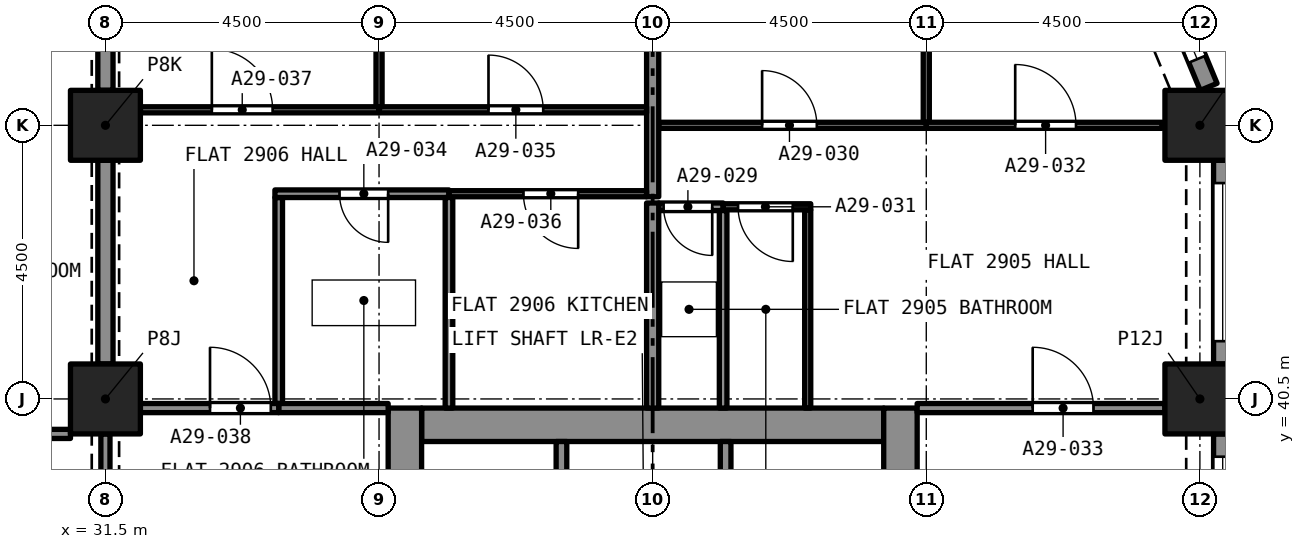
"""IFC4 building model, lengths in metres.
Left out: names, types, materials, properties, quantities, classifications, styles, units other than length and angle.
Written with IfcOpenShell. Run it as: python <this file> out.ifc"""

import sys

from ifc_helpers import new_model, si_unit, direction, frame, frame_2d, origin, origin_2d, place, context, subcontext, project, spatial, rectangle, extrude, element, fill, save


model = new_model("IFC4")
c1 = context("Model", 3, precision=1e-05, world=origin(), true_north=direction((0.0, 1.0)))
c2 = subcontext(c1, "Body", "Model", "MODEL_VIEW")
j1 = project(units=[si_unit("LENGTHUNIT", "METRE"), si_unit("PLANEANGLEUNIT", "RADIAN")], contexts=[c1])
p1 = place(None, origin())
s1 = spatial("IfcSite", under=j1, at=p1, CompositionType="ELEMENT")
p2 = place(p1, origin())
s2 = spatial("IfcBuilding", under=s1, at=p2, CompositionType="ELEMENT")
p3 = place(p2, frame((0.0, 0.0, 105.6)))
s3 = spatial("IfcBuildingStorey", under=s2, at=p3, CompositionType="ELEMENT", Elevation=105.6)
for number, where, z_axis, x_axis in (
    (1, (31.5, 40.5, 0.0), (0.0, 0.0, 1.0), (1.0, 0.0, 0.0)),
    (2, (49.5, 40.5, 0.0), (0.0, 0.0, 1.0), (1.0, 0.0, 0.0)),
    (3, (31.5, 45.0, 0.0), (0.0, 0.0, 1.0), (1.0, 0.0, 0.0)),
    (4, (49.5, 45.0, 0.0), (0.0, 0.0, 1.0), (1.0, 0.0, 0.0)),
):
    element("IfcColumn", number, at=place(p3, frame(where, z_axis=z_axis, x_axis=x_axis)), inside=s3, PredefinedType="COLUMN", context=c2, shape_type="SweptSolid", body=[
        extrude(rectangle(XDim=1.15, YDim=1.15, at=origin_2d()), origin(), (0.0, 0.0, 1.0), 3.2),
    ])
p4 = place(p3, frame((36.7, 40.075, 0.0), z_axis=(0.0, 0.0, 1.0), x_axis=(1.0, 0.0, 0.0)))
e5 = element("IfcWall", 5, at=p4, inside=s3, PredefinedType="SOLIDWALL", context=c2, shape_type="SweptSolid", body=[
    extrude(rectangle(XDim=7.6, YDim=0.55, at=frame_2d((3.8, 0.0))), origin(), (0.0, 0.0, 1.0), 3.2),
])
p5 = place(p3, frame((36.425, 27.15, 0.0), z_axis=(0.0, 0.0, 1.0), x_axis=(0.0, 1.0, 0.0)))
e6 = element("IfcWall", 6, at=p5, inside=s3, PredefinedType="SOLIDWALL", context=c2, shape_type="SweptSolid", body=[
    extrude(rectangle(XDim=13.2, YDim=0.55, at=frame_2d((6.6, 0.0))), origin(), (0.0, 0.0, 1.0), 3.2),
])
p6 = place(p5, frame((8.8, 0.0, 0.0)))
e7 = element("IfcOpeningElement", 7, at=p6, cuts=e6, PredefinedType="OPENING", context=c2, shape_type="SweptSolid", body=[
    extrude(rectangle(XDim=1.2, YDim=2.1, at=frame_2d((0.6, 1.05))), frame((0.0, 0.285, 0.0), z_axis=(0.0, -1.0, 0.0), x_axis=(1.0, 0.0, 0.0)), (0.0, 0.0, 1.0), 0.57),
])
p7 = place(p3, frame((44.575, 27.15, 0.0), z_axis=(0.0, 0.0, 1.0), x_axis=(0.0, 1.0, 0.0)))
e8 = element("IfcWall", 8, at=p7, inside=s3, PredefinedType="SOLIDWALL", context=c2, shape_type="SweptSolid", body=[
    extrude(rectangle(XDim=13.2, YDim=0.55, at=frame_2d((6.6, 0.0))), origin(), (0.0, 0.0, 1.0), 3.2),
])
p8 = place(p7, frame((8.8, 0.0, 0.0)))
e9 = element("IfcOpeningElement", 9, at=p8, cuts=e8, PredefinedType="OPENING", context=c2, shape_type="SweptSolid", body=[
    extrude(rectangle(XDim=1.2, YDim=2.1, at=frame_2d((0.6, 1.05))), frame((0.0, 0.285, 0.0), z_axis=(0.0, -1.0, 0.0), x_axis=(1.0, 0.0, 0.0)), (0.0, 0.0, 1.0), 0.57),
])
p9 = place(p3, frame((49.875, 39.925, 0.0), z_axis=(0.0, 0.0, 1.0), x_axis=(0.0, -1.0, 0.0)))
e10 = element("IfcWall", 10, at=p9, inside=s3, PredefinedType="SOLIDWALL", context=c2, shape_type="SweptSolid", body=[
    extrude(rectangle(XDim=3.35, YDim=0.3, at=frame_2d((1.675, 0.0))), origin(), (0.0, 0.0, 1.0), 3.2),
])
p10 = place(p9, frame((0.375, 0.0, 0.45)))
e11 = element("IfcOpeningElement", 11, at=p10, cuts=e10, PredefinedType="OPENING", context=c2, shape_type="SweptSolid", body=[
    extrude(rectangle(XDim=2.6, YDim=1.95, at=frame_2d((1.3, 0.975))), frame((0.0, 0.16, 0.0), z_axis=(0.0, -1.0, 0.0), x_axis=(1.0, 0.0, 0.0)), (0.0, 0.0, 1.0), 0.32),
])
p11 = place(p3, frame((49.875, 44.425, 0.0), z_axis=(0.0, 0.0, 1.0), x_axis=(0.0, -1.0, 0.0)))
e12 = element("IfcWall", 12, at=p11, inside=s3, PredefinedType="SOLIDWALL", context=c2, shape_type="SweptSolid", body=[
    extrude(rectangle(XDim=3.35, YDim=0.3, at=frame_2d((1.675, 0.0))), origin(), (0.0, 0.0, 1.0), 3.2),
])
p12 = place(p11, frame((0.375, 0.0, 0.45)))
e13 = element("IfcOpeningElement", 13, at=p12, cuts=e12, PredefinedType="OPENING", context=c2, shape_type="SweptSolid", body=[
    extrude(rectangle(XDim=2.6, YDim=1.95, at=frame_2d((1.3, 0.975))), frame((0.0, 0.16, 0.0), z_axis=(0.0, -1.0, 0.0), x_axis=(1.0, 0.0, 0.0)), (0.0, 0.0, 1.0), 0.32),
])
p13 = place(p3, frame((48.816, 47.631, 0.0), z_axis=(0.0, 0.0, 1.0), x_axis=(0.382723818695, -0.923862802911, 0.0)))
e14 = element("IfcWall", 14, at=p13, inside=s3, PredefinedType="SOLIDWALL", context=c2, shape_type="SweptSolid", body=[
    extrude(rectangle(XDim=2.164, YDim=0.3, at=frame_2d((1.082, 0.0))), origin(), (0.0, 0.0, 1.0), 3.2),
])
p14 = place(p13, frame((0.271, 0.0, 0.45)))
e15 = element("IfcOpeningElement", 15, at=p14, cuts=e14, PredefinedType="OPENING", context=c2, shape_type="SweptSolid", body=[
    extrude(rectangle(XDim=1.4, YDim=1.95, at=frame_2d((0.7, 0.975))), frame((0.0, 0.16, 0.0), z_axis=(0.0, -1.0, 0.0), x_axis=(1.0, 0.0, 0.0)), (0.0, 0.0, 1.0), 0.32),
])
p15 = place(p3, frame((41.659, 43.66, 0.0), z_axis=(0.0, 0.0, 1.0), x_axis=(-1.0, 0.0, 0.0)))
e16 = element("IfcWall", 16, at=p15, inside=s3, PredefinedType="PARTITIONING", context=c2, shape_type="SweptSolid", body=[
    extrude(rectangle(XDim=1.059, YDim=0.125, at=frame_2d((0.53, 0.0))), origin(), (0.0, 0.0, 1.0), 2.9),
])
p16 = place(p15, frame((0.179, 0.0, 0.0)))
e17 = element("IfcOpeningElement", 17, at=p16, cuts=e16, PredefinedType="OPENING", context=c2, shape_type="SweptSolid", body=[
    extrude(rectangle(XDim=0.8, YDim=2.1, at=frame_2d((0.4, 1.05))), frame((0.0, 0.073, 0.0), z_axis=(0.0, -1.0, 0.0), x_axis=(1.0, 0.0, 0.0)), (0.0, 0.0, 1.0), 0.145),
])
p17 = place(p3, frame((41.659, 40.35, 0.0), z_axis=(0.0, 0.0, 1.0), x_axis=(0.0, 1.0, 0.0)))
e18 = element("IfcWall", 18, at=p17, inside=s3, PredefinedType="PARTITIONING", context=c2, shape_type="SweptSolid", body=[
    extrude(rectangle(XDim=3.247, YDim=0.125, at=frame_2d((1.624, 0.0))), origin(), (0.0, 0.0, 1.0), 2.9),
])
p18 = place(p3, frame((40.5, 40.35, 0.0), z_axis=(0.0, 0.0, 1.0), x_axis=(0.0, 1.0, 0.0)))
e19 = element("IfcWall", 19, at=p18, inside=s3, PredefinedType="PARTITIONING", context=c2, shape_type="SweptSolid", body=[
    extrude(rectangle(XDim=3.372, YDim=0.2, at=frame_2d((1.686, 0.0))), origin(), (0.0, 0.0, 1.0), 2.9),
])
p19 = place(p3, frame((40.6, 45.0, 0.0), z_axis=(0.0, 0.0, 1.0), x_axis=(1.0, 0.0, 0.0)))
e20 = element("IfcWall", 20, at=p19, inside=s3, PredefinedType="PARTITIONING", context=c2, shape_type="SweptSolid", body=[
    extrude(rectangle(XDim=4.4, YDim=0.1, at=frame_2d((2.2, 0.0))), origin(), (0.0, 0.0, 1.0), 2.9),
])
p20 = place(p19, frame((1.7, 0.0, 0.0)))
e21 = element("IfcOpeningElement", 21, at=p20, cuts=e20, PredefinedType="OPENING", context=c2, shape_type="SweptSolid", body=[
    extrude(rectangle(XDim=0.9, YDim=2.1, at=frame_2d((0.45, 1.05))), frame((0.0, 0.06, 0.0), z_axis=(0.0, -1.0, 0.0), x_axis=(1.0, 0.0, 0.0)), (0.0, 0.0, 1.0), 0.12),
])
p21 = place(p3, frame((45.0, 45.05, 0.0), z_axis=(0.0, 0.0, 1.0), x_axis=(0.0, 1.0, 0.0)))
e22 = element("IfcWall", 22, at=p21, inside=s3, PredefinedType="PARTITIONING", context=c2, shape_type="SweptSolid", body=[
    extrude(rectangle(XDim=3.828, YDim=0.1, at=frame_2d((1.914, 0.0))), origin(), (0.0, 0.0, 1.0), 2.9),
])
p22 = place(p3, frame((43.05, 40.35, 0.0), z_axis=(0.0, 0.0, 1.0), x_axis=(0.0, 1.0, 0.0)))
e23 = element("IfcWall", 23, at=p22, inside=s3, PredefinedType="PARTITIONING", context=c2, shape_type="SweptSolid", body=[
    extrude(rectangle(XDim=3.26, YDim=0.1, at=frame_2d((1.63, 0.0))), origin(), (0.0, 0.0, 1.0), 2.9),
])
p23 = place(p3, frame((43.1, 43.66, 0.0), z_axis=(0.0, 0.0, 1.0), x_axis=(-1.0, 0.0, 0.0)))
e24 = element("IfcWall", 24, at=p23, inside=s3, PredefinedType="PARTITIONING", context=c2, shape_type="SweptSolid", body=[
    extrude(rectangle(XDim=1.441, YDim=0.1, at=frame_2d((0.72, 0.0))), origin(), (0.0, 0.0, 1.0), 2.9),
])
p24 = place(p23, frame((0.295, 0.0, 0.0)))
e25 = element("IfcOpeningElement", 25, at=p24, cuts=e24, PredefinedType="OPENING", context=c2, shape_type="SweptSolid", body=[
    extrude(rectangle(XDim=0.9, YDim=2.1, at=frame_2d((0.45, 1.05))), frame((0.0, 0.06, 0.0), z_axis=(0.0, -1.0, 0.0), x_axis=(1.0, 0.0, 0.0)), (0.0, 0.0, 1.0), 0.12),
])
p25 = place(p3, frame((45.0, 45.0, 0.0), z_axis=(0.0, 0.0, 1.0), x_axis=(1.0, 0.0, 0.0)))
e26 = element("IfcWall", 26, at=p25, inside=s3, PredefinedType="PARTITIONING", context=c2, shape_type="SweptSolid", body=[
    extrude(rectangle(XDim=3.878, YDim=0.1, at=frame_2d((1.939, 0.0))), origin(), (0.0, 0.0, 1.0), 2.9),
])
p26 = place(p25, frame((1.462, 0.0, 0.0)))
e27 = element("IfcOpeningElement", 27, at=p26, cuts=e26, PredefinedType="OPENING", context=c2, shape_type="SweptSolid", body=[
    extrude(rectangle(XDim=1.0, YDim=2.1, at=frame_2d((0.5, 1.05))), frame((0.0, 0.06, 0.0), z_axis=(0.0, -1.0, 0.0), x_axis=(1.0, 0.0, 0.0)), (0.0, 0.0, 1.0), 0.12),
])
p27 = place(p3, frame((40.5, 43.825, 0.0), z_axis=(0.0, 0.0, 1.0), x_axis=(0.0, 1.0, 0.0)))
e28 = element("IfcWall", 28, at=p27, inside=s3, PredefinedType="PARTITIONING", context=c2, shape_type="SweptSolid", body=[
    extrude(rectangle(XDim=5.1, YDim=0.2, at=frame_2d((2.55, 0.0))), origin(), (0.0, 0.0, 1.0), 2.9),
])
p28 = place(p3, frame((44.85, 40.35, 0.0), z_axis=(0.0, 0.0, 1.0), x_axis=(1.0, 0.0, 0.0)))
e29 = element("IfcWall", 29, at=p28, inside=s3, PredefinedType="PARTITIONING", context=c2, shape_type="SweptSolid", body=[
    extrude(rectangle(XDim=4.075, YDim=0.15, at=frame_2d((2.038, 0.0))), origin(), (0.0, 0.0, 1.0), 2.9),
])
p29 = place(p28, frame((1.9, 0.0, 0.0)))
e30 = element("IfcOpeningElement", 30, at=p29, cuts=e29, PredefinedType="OPENING", context=c2, shape_type="SweptSolid", body=[
    extrude(rectangle(XDim=1.0, YDim=2.1, at=frame_2d((0.5, 1.05))), frame((0.0, 0.085, 0.0), z_axis=(0.0, -1.0, 0.0), x_axis=(1.0, 0.0, 0.0)), (0.0, 0.0, 1.0), 0.17),
])
p30 = place(p3, frame((34.35, 40.425, 0.0), z_axis=(0.0, 0.0, 1.0), x_axis=(0.0, 1.0, 0.0)))
e31 = element("IfcWall", 31, at=p30, inside=s3, PredefinedType="PARTITIONING", context=c2, shape_type="SweptSolid", body=[
    extrude(rectangle(XDim=3.387, YDim=0.125, at=frame_2d((1.694, 0.0))), origin(), (0.0, 0.0, 1.0), 2.9),
])
p31 = place(p3, frame((37.15, 43.875, 0.0), z_axis=(0.0, 0.0, 1.0), x_axis=(-1.0, 0.0, 0.0)))
e32 = element("IfcWall", 32, at=p31, inside=s3, PredefinedType="PARTITIONING", context=c2, shape_type="SweptSolid", body=[
    extrude(rectangle(XDim=2.862, YDim=0.125, at=frame_2d((1.431, 0.0))), origin(), (0.0, 0.0, 1.0), 2.9),
])
p32 = place(p31, frame((1.0, 0.0, 0.0)))
e33 = element("IfcOpeningElement", 33, at=p32, cuts=e32, PredefinedType="OPENING", context=c2, shape_type="SweptSolid", body=[
    extrude(rectangle(XDim=0.8, YDim=2.1, at=frame_2d((0.4, 1.05))), frame((0.0, 0.073, 0.0), z_axis=(0.0, -1.0, 0.0), x_axis=(1.0, 0.0, 0.0)), (0.0, 0.0, 1.0), 0.145),
])
p33 = place(p3, frame((37.15, 40.35, 0.0), z_axis=(0.0, 0.0, 1.0), x_axis=(0.0, 1.0, 0.0)))
e34 = element("IfcWall", 34, at=p33, inside=s3, PredefinedType="PARTITIONING", context=c2, shape_type="SweptSolid", body=[
    extrude(rectangle(XDim=3.462, YDim=0.125, at=frame_2d((1.731, 0.0))), origin(), (0.0, 0.0, 1.0), 2.9),
])
p34 = place(p3, frame((34.35, 40.35, 0.0), z_axis=(0.0, 0.0, 1.0), x_axis=(1.0, 0.0, 0.0)))
e35 = element("IfcWall", 35, at=p34, inside=s3, PredefinedType="PARTITIONING", context=c2, shape_type="SweptSolid", body=[
    extrude(rectangle(XDim=1.8, YDim=0.15, at=frame_2d((0.9, 0.0))), origin(), (0.0, 0.0, 1.0), 2.9),
])
p35 = place(p3, frame((36.0, 45.255, 0.0), z_axis=(0.0, 0.0, 1.0), x_axis=(1.0, 0.0, 0.0)))
e36 = element("IfcWall", 36, at=p35, inside=s3, PredefinedType="PARTITIONING", context=c2, shape_type="SweptSolid", body=[
    extrude(rectangle(XDim=4.4, YDim=0.1, at=frame_2d((2.2, 0.0))), origin(), (0.0, 0.0, 1.0), 2.9),
])
p36 = place(p35, frame((1.8, 0.0, 0.0)))
e37 = element("IfcOpeningElement", 37, at=p36, cuts=e36, PredefinedType="OPENING", context=c2, shape_type="SweptSolid", body=[
    extrude(rectangle(XDim=0.9, YDim=2.1, at=frame_2d((0.45, 1.05))), frame((0.0, 0.06, 0.0), z_axis=(0.0, -1.0, 0.0), x_axis=(1.0, 0.0, 0.0)), (0.0, 0.0, 1.0), 0.12),
])
p37 = place(p3, frame((36.0, 45.305, 0.0), z_axis=(0.0, 0.0, 1.0), x_axis=(0.0, 1.0, 0.0)))
e38 = element("IfcWall", 38, at=p37, inside=s3, PredefinedType="PARTITIONING", context=c2, shape_type="SweptSolid", body=[
    extrude(rectangle(XDim=3.62, YDim=0.1, at=frame_2d((1.81, 0.0))), origin(), (0.0, 0.0, 1.0), 2.9),
])
p38 = place(p3, frame((40.4, 43.875, 0.0), z_axis=(0.0, 0.0, 1.0), x_axis=(-1.0, 0.0, 0.0)))
e39 = element("IfcWall", 39, at=p38, inside=s3, PredefinedType="PARTITIONING", context=c2, shape_type="SweptSolid", body=[
    extrude(rectangle(XDim=3.25, YDim=0.1, at=frame_2d((1.625, 0.0))), origin(), (0.0, 0.0, 1.0), 2.9),
])
p39 = place(p38, frame((1.125, 0.0, 0.0)))
e40 = element("IfcOpeningElement", 40, at=p39, cuts=e39, PredefinedType="OPENING", context=c2, shape_type="SweptSolid", body=[
    extrude(rectangle(XDim=0.9, YDim=2.1, at=frame_2d((0.45, 1.05))), frame((0.0, 0.06, 0.0), z_axis=(0.0, -1.0, 0.0), x_axis=(1.0, 0.0, 0.0)), (0.0, 0.0, 1.0), 0.12),
])
p40 = place(p3, frame((32.075, 45.255, 0.0), z_axis=(0.0, 0.0, 1.0), x_axis=(1.0, 0.0, 0.0)))
e41 = element("IfcWall", 41, at=p40, inside=s3, PredefinedType="PARTITIONING", context=c2, shape_type="SweptSolid", body=[
    extrude(rectangle(XDim=3.925, YDim=0.1, at=frame_2d((1.962, 0.0))), origin(), (0.0, 0.0, 1.0), 2.9),
])
p41 = place(p40, frame((1.175, 0.0, 0.0)))
e42 = element("IfcOpeningElement", 42, at=p41, cuts=e41, PredefinedType="OPENING", context=c2, shape_type="SweptSolid", body=[
    extrude(rectangle(XDim=1.0, YDim=2.1, at=frame_2d((0.5, 1.05))), frame((0.0, 0.06, 0.0), z_axis=(0.0, -1.0, 0.0), x_axis=(1.0, 0.0, 0.0)), (0.0, 0.0, 1.0), 0.12),
])
p42 = place(p3, frame((31.5, 41.075, 0.0), z_axis=(0.0, 0.0, 1.0), x_axis=(0.0, 1.0, 0.0)))
e43 = element("IfcWall", 43, at=p42, inside=s3, PredefinedType="PARTITIONING", context=c2, shape_type="SweptSolid", body=[
    extrude(rectangle(XDim=3.35, YDim=0.25, at=frame_2d((1.675, 0.0))), origin(), (0.0, 0.0, 1.0), 2.38),
])
p43 = place(p3, frame((32.075, 40.35, 0.0), z_axis=(0.0, 0.0, 1.0), x_axis=(1.0, 0.0, 0.0)))
e44 = element("IfcWall", 44, at=p43, inside=s3, PredefinedType="PARTITIONING", context=c2, shape_type="SweptSolid", body=[
    extrude(rectangle(XDim=2.275, YDim=0.15, at=frame_2d((1.138, 0.0))), origin(), (0.0, 0.0, 1.0), 2.9),
])
p44 = place(p43, frame((1.145, 0.0, 0.0)))
e45 = element("IfcOpeningElement", 45, at=p44, cuts=e44, PredefinedType="OPENING", context=c2, shape_type="SweptSolid", body=[
    extrude(rectangle(XDim=1.0, YDim=2.1, at=frame_2d((0.5, 1.05))), frame((0.0, 0.085, 0.0), z_axis=(0.0, -1.0, 0.0), x_axis=(1.0, 0.0, 0.0)), (0.0, 0.0, 1.0), 0.17),
])
p45 = place(p3, frame((31.5, 45.575, 0.0), z_axis=(0.0, 0.0, 1.0), x_axis=(0.0, 1.0, 0.0)))
e46 = element("IfcWall", 46, at=p45, inside=s3, PredefinedType="PARTITIONING", context=c2, shape_type="SweptSolid", body=[
    extrude(rectangle(XDim=3.35, YDim=0.25, at=frame_2d((1.675, 0.0))), origin(), (0.0, 0.0, 1.0), 2.38),
])
p46 = place(p3, frame((27.0, 39.925, 0.0), z_axis=(0.0, 0.0, 1.0), x_axis=(1.0, 0.0, 0.0)))
e47 = element("IfcWall", 47, at=p46, inside=s3, PredefinedType="PARTITIONING", context=c2, shape_type="SweptSolid", body=[
    extrude(rectangle(XDim=3.925, YDim=0.15, at=frame_2d((1.962, 0.0))), origin(), (0.0, 0.0, 1.0), 2.75),
])
p47 = place(p46, frame((1.75, 0.0, 0.0)))
e48 = element("IfcOpeningElement", 48, at=p47, cuts=e47, PredefinedType="OPENING", context=c2, shape_type="SweptSolid", body=[
    extrude(rectangle(XDim=1.0, YDim=2.1, at=frame_2d((0.5, 1.05))), frame((0.0, 0.085, 0.0), z_axis=(0.0, -1.0, 0.0), x_axis=(1.0, 0.0, 0.0)), (0.0, 0.0, 1.0), 0.17),
])
p48 = place(p3, frame((31.5, 36.575, 0.0), z_axis=(0.0, 0.0, 1.0), x_axis=(0.0, 1.0, 0.0)))
e49 = element("IfcWall", 49, at=p48, inside=s3, PredefinedType="PARTITIONING", context=c2, shape_type="SweptSolid", body=[
    extrude(rectangle(XDim=3.35, YDim=0.15, at=frame_2d((1.675, 0.0))), origin(), (0.0, 0.0, 1.0), 2.38),
])
p49 = place(p48, frame((1.075, 0.0, 0.0)))
e50 = element("IfcOpeningElement", 50, at=p49, cuts=e49, PredefinedType="OPENING", context=c2, shape_type="SweptSolid", body=[
    extrude(rectangle(XDim=1.2, YDim=2.1, at=frame_2d((0.6, 1.05))), frame((0.0, 0.085, 0.0), z_axis=(0.0, -1.0, 0.0), x_axis=(1.0, 0.0, 0.0)), (0.0, 0.0, 1.0), 0.17),
])
for number, where, z_axis, x_axis in (
    (51, (41.7, 37.5, 0.0), (0.0, 0.0, 1.0), (0.0, 1.0, 0.0)),
    (52, (39.0, 37.5, 0.0), (0.0, 0.0, 1.0), (0.0, 1.0, 0.0)),
):
    element("IfcWall", number, at=place(p3, frame(where, z_axis=z_axis, x_axis=x_axis)), inside=s3, PredefinedType="SOLIDWALL", context=c2, shape_type="SweptSolid", body=[
        extrude(rectangle(XDim=2.3, YDim=0.175, at=frame_2d((1.15, 0.0))), origin(), (0.0, 0.0, 1.0), 2.9),
    ])
p50 = place(p10, origin())
e53 = element("IfcWindow", 53, at=p50, inside=s3, PartitioningType="SINGLE_PANEL", PredefinedType="WINDOW", context=c2, shape_type="SweptSolid", body=[
    extrude(rectangle(XDim=2.6, YDim=1.95, at=frame_2d((1.3, 0.975))), frame((0.0, 0.03, 0.0), z_axis=(0.0, -1.0, 0.0), x_axis=(1.0, 0.0, 0.0)), (0.0, 0.0, 1.0), 0.06),
])
fill(e11, e53)
p51 = place(p12, origin())
e54 = element("IfcWindow", 54, at=p51, inside=s3, PartitioningType="SINGLE_PANEL", PredefinedType="WINDOW", context=c2, shape_type="SweptSolid", body=[
    extrude(rectangle(XDim=2.6, YDim=1.95, at=frame_2d((1.3, 0.975))), frame((0.0, 0.03, 0.0), z_axis=(0.0, -1.0, 0.0), x_axis=(1.0, 0.0, 0.0)), (0.0, 0.0, 1.0), 0.06),
])
fill(e13, e54)
p52 = place(p14, origin())
e55 = element("IfcWindow", 55, at=p52, inside=s3, PartitioningType="SINGLE_PANEL", PredefinedType="WINDOW", context=c2, shape_type="SweptSolid", body=[
    extrude(rectangle(XDim=1.4, YDim=1.95, at=frame_2d((0.7, 0.975))), frame((0.0, 0.03, 0.0), z_axis=(0.0, -1.0, 0.0), x_axis=(1.0, 0.0, 0.0)), (0.0, 0.0, 1.0), 0.06),
])
fill(e15, e55)
p53 = place(p16, origin())
e56 = element("IfcDoor", 56, at=p53, inside=s3, OperationType="SINGLE_SWING_RIGHT", PredefinedType="DOOR", context=c2, shape_type="SweptSolid", body=[
    extrude(rectangle(XDim=0.8, YDim=2.1, at=frame_2d((0.4, 1.05))), frame((0.0, 0.025, 0.0), z_axis=(0.0, -1.0, 0.0), x_axis=(1.0, 0.0, 0.0)), (0.0, 0.0, 1.0), 0.05),
])
fill(e17, e56)
p54 = place(p20, origin())
e57 = element("IfcDoor", 57, at=p54, inside=s3, OperationType="SINGLE_SWING_LEFT", PredefinedType="DOOR", context=c2, shape_type="SweptSolid", body=[
    extrude(rectangle(XDim=0.9, YDim=2.1, at=frame_2d((0.45, 1.05))), frame((0.0, 0.025, 0.0), z_axis=(0.0, -1.0, 0.0), x_axis=(1.0, 0.0, 0.0)), (0.0, 0.0, 1.0), 0.05),
])
fill(e21, e57)
p55 = place(p24, origin())
e58 = element("IfcDoor", 58, at=p55, inside=s3, OperationType="SINGLE_SWING_RIGHT", PredefinedType="DOOR", context=c2, shape_type="SweptSolid", body=[
    extrude(rectangle(XDim=0.9, YDim=2.1, at=frame_2d((0.45, 1.05))), frame((0.0, 0.025, 0.0), z_axis=(0.0, -1.0, 0.0), x_axis=(1.0, 0.0, 0.0)), (0.0, 0.0, 1.0), 0.05),
])
fill(e25, e58)
p56 = place(p26, origin())
e59 = element("IfcDoor", 59, at=p56, inside=s3, OperationType="SINGLE_SWING_RIGHT", PredefinedType="DOOR", context=c2, shape_type="SweptSolid", body=[
    extrude(rectangle(XDim=1.0, YDim=2.1, at=frame_2d((0.5, 1.05))), frame((0.0, 0.025, 0.0), z_axis=(0.0, -1.0, 0.0), x_axis=(1.0, 0.0, 0.0)), (0.0, 0.0, 1.0), 0.05),
])
fill(e27, e59)
p57 = place(p29, origin())
e60 = element("IfcDoor", 60, at=p57, inside=s3, OperationType="SINGLE_SWING_RIGHT", PredefinedType="DOOR", context=c2, shape_type="SweptSolid", body=[
    extrude(rectangle(XDim=1.0, YDim=2.1, at=frame_2d((0.5, 1.05))), frame((0.0, 0.025, 0.0), z_axis=(0.0, -1.0, 0.0), x_axis=(1.0, 0.0, 0.0)), (0.0, 0.0, 1.0), 0.05),
])
fill(e30, e60)
p58 = place(p32, origin())
e61 = element("IfcDoor", 61, at=p58, inside=s3, OperationType="SINGLE_SWING_LEFT", PredefinedType="DOOR", context=c2, shape_type="SweptSolid", body=[
    extrude(rectangle(XDim=0.8, YDim=2.1, at=frame_2d((0.4, 1.05))), frame((0.0, 0.025, 0.0), z_axis=(0.0, -1.0, 0.0), x_axis=(1.0, 0.0, 0.0)), (0.0, 0.0, 1.0), 0.05),
])
fill(e33, e61)
p59 = place(p36, origin())
e62 = element("IfcDoor", 62, at=p59, inside=s3, OperationType="SINGLE_SWING_RIGHT", PredefinedType="DOOR", context=c2, shape_type="SweptSolid", body=[
    extrude(rectangle(XDim=0.9, YDim=2.1, at=frame_2d((0.45, 1.05))), frame((0.0, 0.025, 0.0), z_axis=(0.0, -1.0, 0.0), x_axis=(1.0, 0.0, 0.0)), (0.0, 0.0, 1.0), 0.05),
])
fill(e37, e62)
p60 = place(p39, origin())
e63 = element("IfcDoor", 63, at=p60, inside=s3, OperationType="SINGLE_SWING_LEFT", PredefinedType="DOOR", context=c2, shape_type="SweptSolid", body=[
    extrude(rectangle(XDim=0.9, YDim=2.1, at=frame_2d((0.45, 1.05))), frame((0.0, 0.025, 0.0), z_axis=(0.0, -1.0, 0.0), x_axis=(1.0, 0.0, 0.0)), (0.0, 0.0, 1.0), 0.05),
])
fill(e40, e63)
p61 = place(p41, origin())
e64 = element("IfcDoor", 64, at=p61, inside=s3, OperationType="SINGLE_SWING_LEFT", PredefinedType="DOOR", context=c2, shape_type="SweptSolid", body=[
    extrude(rectangle(XDim=1.0, YDim=2.1, at=frame_2d((0.5, 1.05))), frame((0.0, 0.025, 0.0), z_axis=(0.0, -1.0, 0.0), x_axis=(1.0, 0.0, 0.0)), (0.0, 0.0, 1.0), 0.05),
])
fill(e42, e64)
p62 = place(p44, origin())
e65 = element("IfcDoor", 65, at=p62, inside=s3, OperationType="SINGLE_SWING_RIGHT", PredefinedType="DOOR", context=c2, shape_type="SweptSolid", body=[
    extrude(rectangle(XDim=1.0, YDim=2.1, at=frame_2d((0.5, 1.05))), frame((0.0, 0.025, 0.0), z_axis=(0.0, -1.0, 0.0), x_axis=(1.0, 0.0, 0.0)), (0.0, 0.0, 1.0), 0.05),
])
fill(e45, e65)
save(model, sys.argv[1])
